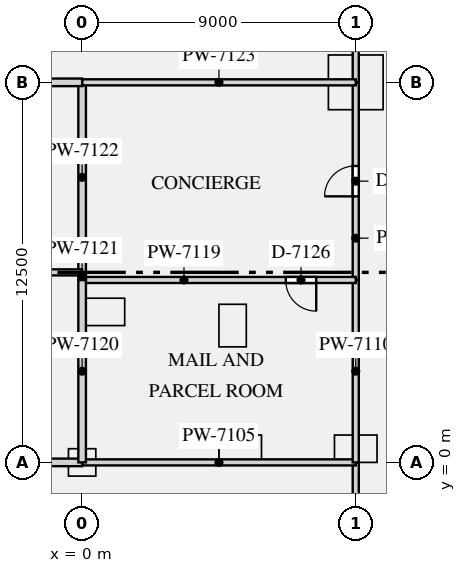
"""IFC4 building model, lengths in metres.
Left out: names, types, materials, properties, quantities, classifications, styles, units other than length and angle.
Written with IfcOpenShell. Run it as: python <this file> out.ifc"""

import sys

from ifc_helpers import new_model, si_unit, direction, frame, frame_2d, origin, origin_with_axes, origin_2d, place, context, subcontext, project, spatial, rectangle, extrude, element, fill, save


model = new_model("IFC4")
c1 = context("Model", 3, precision=1e-05, world=origin(), true_north=direction((0.0, 1.0)))
c2 = subcontext(c1, "Body", "Model", "MODEL_VIEW")
j1 = project(units=[si_unit("LENGTHUNIT", "METRE"), si_unit("PLANEANGLEUNIT", "RADIAN")], contexts=[c1])
p1 = place(None, origin())
s1 = spatial("IfcSite", under=j1, at=p1, CompositionType="ELEMENT")
p2 = place(p1, origin())
s2 = spatial("IfcBuilding", under=s1, at=p2, CompositionType="ELEMENT")
p3 = place(p2, origin())
s3 = spatial("IfcBuildingStorey", under=s2, at=p3, CompositionType="ELEMENT", Elevation=0.0)
for number, where, z_axis, x_axis in (
    (1, (9.0, 0.45, 0.0), (0.0, 0.0, 1.0), (1.0, 0.0, 0.0)),
    (2, (0.7, 4.95, 0.0), (0.0, 0.0, 1.0), (1.0, 0.0, 0.0)),
    (3, (4.95, 4.5, 0.0), (0.0, 0.0, 1.0), (0.0, -1.0, 0.0)),
    (4, (5.2, 0.45, 0.0), (0.0, 0.0, 1.0), (1.0, 0.0, 0.0)),
):
    element("IfcColumn", number, at=place(p3, frame(where, z_axis=z_axis, x_axis=x_axis)), inside=s3, PredefinedType="USERDEFINED", context=c2, shape_type="SweptSolid", body=[
        extrude(rectangle(XDim=1.4, YDim=0.9, at=origin_2d()), origin(), (0.0, 0.0, 1.0), 6.5),
    ])
p4 = place(p3, origin_with_axes())
e5 = element("IfcColumn", 5, at=p4, inside=s3, PredefinedType="COLUMN", context=c2, shape_type="SweptSolid", body=[
    extrude(rectangle(XDim=0.9, YDim=0.9, at=origin_2d()), origin(), (0.0, 0.0, 1.0), 6.5),
])
p5 = place(p3, frame((9.0, 12.5, 0.0), z_axis=(0.0, 0.0, 1.0), x_axis=(1.0, 0.0, 0.0)))
e6 = element("IfcColumn", 6, at=p5, inside=s3, PredefinedType="COLUMN", context=c2, shape_type="SweptSolid", body=[
    extrude(rectangle(XDim=1.8, YDim=1.8, at=origin_2d()), origin(), (0.0, 0.0, 1.0), 6.5),
])
p6 = place(p3, frame((9.0, -4.5, 0.0), z_axis=(0.0, 0.0, 1.0), x_axis=(0.0, 1.0, 0.0)))
e7 = element("IfcWall", 7, at=p6, inside=s3, PredefinedType="PARTITIONING", context=c2, shape_type="SweptSolid", body=[
    extrude(rectangle(XDim=4.5, YDim=0.2, at=frame_2d((2.25, 0.0))), origin(), (0.0, 0.0, 1.0), 6.098),
])
p7 = place(p6, frame((1.75, 0.0, 0.0)))
e8 = element("IfcOpeningElement", 8, at=p7, cuts=e7, PredefinedType="OPENING", context=c2, shape_type="SweptSolid", body=[
    extrude(rectangle(XDim=1.0, YDim=2.1, at=frame_2d((0.5, 1.05))), frame((0.0, 0.11, 0.0), z_axis=(0.0, -1.0, 0.0), x_axis=(1.0, 0.0, 0.0)), (0.0, 0.0, 1.0), 0.22),
])
p8 = place(p3, origin_with_axes())
e9 = element("IfcWall", 9, at=p8, inside=s3, PredefinedType="PARTITIONING", context=c2, shape_type="SweptSolid", body=[
    extrude(rectangle(XDim=9.0, YDim=0.2, at=frame_2d((4.5, 0.0))), origin(), (0.0, 0.0, 1.0), 6.098),
])
p9 = place(p3, frame((-9.0, 0.0, 0.0), z_axis=(0.0, 0.0, 1.0), x_axis=(1.0, 0.0, 0.0)))
e10 = element("IfcWall", 10, at=p9, inside=s3, PredefinedType="PARTITIONING", context=c2, shape_type="SweptSolid", body=[
    extrude(rectangle(XDim=9.0, YDim=0.25, at=frame_2d((4.5, 0.0))), origin(), (0.0, 0.0, 1.0), 6.098),
])
p10 = place(p3, frame((9.0, 0.0, 0.0), z_axis=(0.0, 0.0, 1.0), x_axis=(0.0, 1.0, 0.0)))
e11 = element("IfcWall", 11, at=p10, inside=s3, PredefinedType="PARTITIONING", context=c2, shape_type="SweptSolid", body=[
    extrude(rectangle(XDim=6.0, YDim=0.2, at=frame_2d((3.0, 0.0))), origin(), (0.0, 0.0, 1.0), 6.098),
])
p11 = place(p3, frame((9.0, 6.0, 0.0), z_axis=(0.0, 0.0, 1.0), x_axis=(0.0, 1.0, 0.0)))
e12 = element("IfcWall", 12, at=p11, inside=s3, PredefinedType="PARTITIONING", context=c2, shape_type="SweptSolid", body=[
    extrude(rectangle(XDim=6.5, YDim=0.2, at=frame_2d((3.25, 0.0))), origin(), (0.0, 0.0, 1.0), 6.098),
])
p12 = place(p11, frame((2.75, 0.0, 0.0)))
e13 = element("IfcOpeningElement", 13, at=p12, cuts=e12, PredefinedType="OPENING", context=c2, shape_type="SweptSolid", body=[
    extrude(rectangle(XDim=1.0, YDim=2.1, at=frame_2d((0.5, 1.05))), frame((0.0, 0.11, 0.0), z_axis=(0.0, -1.0, 0.0), x_axis=(1.0, 0.0, 0.0)), (0.0, 0.0, 1.0), 0.22),
])
p13 = place(p3, frame((9.0, 12.5, 0.0), z_axis=(0.0, 0.0, 1.0), x_axis=(0.0, 1.0, 0.0)))
e14 = element("IfcWall", 14, at=p13, inside=s3, PredefinedType="PARTITIONING", context=c2, shape_type="SweptSolid", body=[
    extrude(rectangle(XDim=11.5, YDim=0.2, at=frame_2d((5.75, 0.0))), origin(), (0.0, 0.0, 1.0), 6.098),
])
p14 = place(p13, frame((4.85, 0.0, 0.0)))
e15 = element("IfcOpeningElement", 15, at=p14, cuts=e14, PredefinedType="OPENING", context=c2, shape_type="SweptSolid", body=[
    extrude(rectangle(XDim=1.8, YDim=2.4, at=frame_2d((0.9, 1.2))), frame((0.0, 0.11, 0.0), z_axis=(0.0, -1.0, 0.0), x_axis=(1.0, 0.0, 0.0)), (0.0, 0.0, 1.0), 0.22),
])
p15 = place(p3, frame((0.0, 6.0, 0.0), z_axis=(0.0, 0.0, 1.0), x_axis=(1.0, 0.0, 0.0)))
e16 = element("IfcWall", 16, at=p15, inside=s3, PredefinedType="PARTITIONING", context=c2, shape_type="SweptSolid", body=[
    extrude(rectangle(XDim=9.0, YDim=0.2, at=frame_2d((4.5, 0.0))), origin(), (0.0, 0.0, 1.0), 6.098),
])
p16 = place(p15, frame((6.7, 0.0, 0.0)))
e17 = element("IfcOpeningElement", 17, at=p16, cuts=e16, PredefinedType="OPENING", context=c2, shape_type="SweptSolid", body=[
    extrude(rectangle(XDim=1.0, YDim=2.1, at=frame_2d((0.5, 1.05))), frame((0.0, 0.11, 0.0), z_axis=(0.0, -1.0, 0.0), x_axis=(1.0, 0.0, 0.0)), (0.0, 0.0, 1.0), 0.22),
])
p17 = place(p3, frame((0.0, 0.0, 0.0), z_axis=(0.0, 0.0, 1.0), x_axis=(0.0, 1.0, 0.0)))
e18 = element("IfcWall", 18, at=p17, inside=s3, PredefinedType="PARTITIONING", context=c2, shape_type="SweptSolid", body=[
    extrude(rectangle(XDim=6.0, YDim=0.25, at=frame_2d((3.0, 0.0))), origin(), (0.0, 0.0, 1.0), 6.098),
])
p18 = place(p3, frame((0.0, 6.0, 0.0), z_axis=(0.0, 0.0, 1.0), x_axis=(0.0, 1.0, 0.0)))
e19 = element("IfcWall", 19, at=p18, inside=s3, PredefinedType="PARTITIONING", context=c2, shape_type="SweptSolid", body=[
    extrude(rectangle(XDim=0.25, YDim=0.25, at=frame_2d((0.125, 0.0))), origin(), (0.0, 0.0, 1.0), 6.098),
])
p19 = place(p3, frame((0.0, 6.25, 0.0), z_axis=(0.0, 0.0, 1.0), x_axis=(0.0, 1.0, 0.0)))
e20 = element("IfcWall", 20, at=p19, inside=s3, PredefinedType="PARTITIONING", context=c2, shape_type="SweptSolid", body=[
    extrude(rectangle(XDim=6.25, YDim=0.25, at=frame_2d((3.125, 0.0))), origin(), (0.0, 0.0, 1.0), 6.098),
])
p20 = place(p3, frame((0.0, 12.5, 0.0), z_axis=(0.0, 0.0, 1.0), x_axis=(1.0, 0.0, 0.0)))
e21 = element("IfcWall", 21, at=p20, inside=s3, PredefinedType="PARTITIONING", context=c2, shape_type="SweptSolid", body=[
    extrude(rectangle(XDim=9.0, YDim=0.2, at=frame_2d((4.5, 0.0))), origin(), (0.0, 0.0, 1.0), 6.098),
])
p21 = place(p3, frame((-18.0, 6.25, 0.0), z_axis=(0.0, 0.0, 1.0), x_axis=(1.0, 0.0, 0.0)))
e22 = element("IfcWall", 22, at=p21, inside=s3, PredefinedType="PARTITIONING", context=c2, shape_type="SweptSolid", body=[
    extrude(rectangle(XDim=18.0, YDim=0.2, at=frame_2d((9.0, 0.0))), origin(), (0.0, 0.0, 1.0), 6.098),
])
p22 = place(p3, frame((-18.0, 12.5, 0.0), z_axis=(0.0, 0.0, 1.0), x_axis=(1.0, 0.0, 0.0)))
e23 = element("IfcWall", 23, at=p22, inside=s3, PredefinedType="PARTITIONING", context=c2, shape_type="SweptSolid", body=[
    extrude(rectangle(XDim=18.0, YDim=0.25, at=frame_2d((9.0, 0.0))), origin(), (0.0, 0.0, 1.0), 6.098),
])
p23 = place(p12, origin())
e24 = element("IfcDoor", 24, at=p23, inside=s3, OperationType="SINGLE_SWING_LEFT", PredefinedType="DOOR", context=c2, shape_type="SweptSolid", body=[
    extrude(rectangle(XDim=1.0, YDim=2.1, at=frame_2d((0.5, 1.05))), frame((0.0, 0.025, 0.0), z_axis=(0.0, -1.0, 0.0), x_axis=(1.0, 0.0, 0.0)), (0.0, 0.0, 1.0), 0.05),
])
fill(e13, e24)
p24 = place(p16, frame((1.0, 0.0, 0.0), z_axis=(0.0, 0.0, 1.0), x_axis=(-1.0, 0.0, 0.0)))
e25 = element("IfcDoor", 25, at=p24, inside=s3, OperationType="SINGLE_SWING_LEFT", PredefinedType="DOOR", context=c2, shape_type="SweptSolid", body=[
    extrude(rectangle(XDim=1.0, YDim=2.1, at=frame_2d((0.5, 1.05))), frame((0.0, 0.025, 0.0), z_axis=(0.0, -1.0, 0.0), x_axis=(1.0, 0.0, 0.0)), (0.0, 0.0, 1.0), 0.05),
])
fill(e17, e25)
save(model, sys.argv[1])
